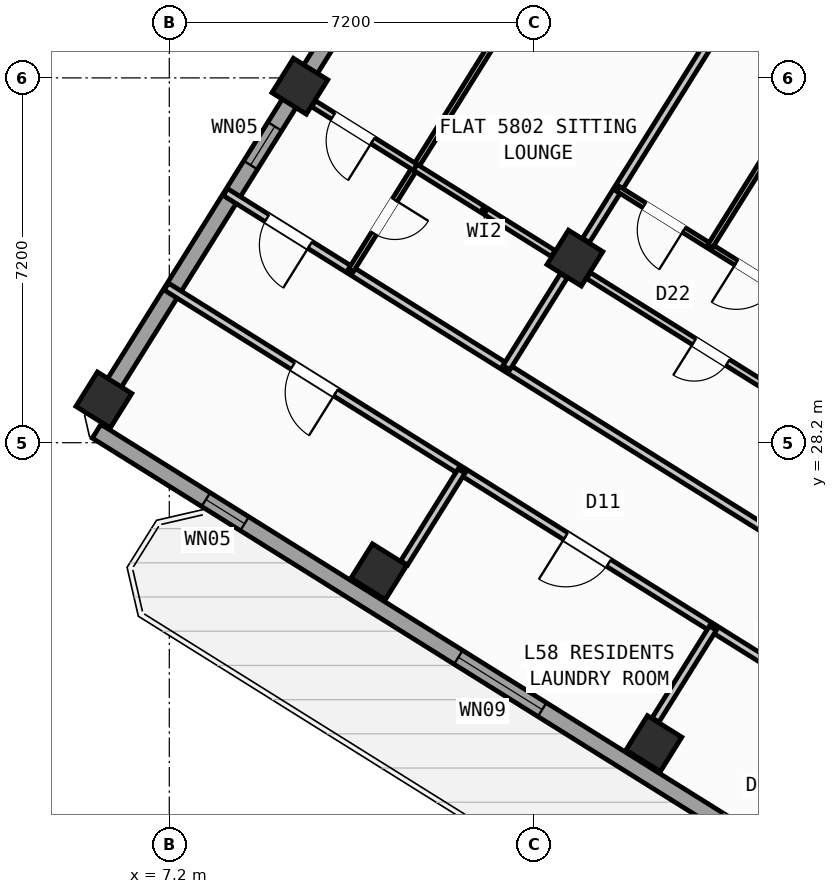
"""IFC4 building model, lengths in metres.
Left out: names, types, materials, properties, quantities, classifications, styles, units other than length and angle.
Written with IfcOpenShell. Run it as: python <this file> out.ifc"""

import sys

from ifc_helpers import new_model, si_unit, direction, frame, frame_2d, origin, origin_2d, place, context, subcontext, project, spatial, rectangle, hollow_rectangle, extrude, source, transform, mapped, element, fill, save


model = new_model("IFC4")
c1 = context("Model", 3, precision=1e-05, world=origin(), true_north=direction((0.0, 1.0)))
c2 = subcontext(c1, "Body", "Model", "MODEL_VIEW")
j1 = project(units=[si_unit("LENGTHUNIT", "METRE"), si_unit("PLANEANGLEUNIT", "RADIAN")], contexts=[c1])
p1 = place(None, origin())
s1 = spatial("IfcSite", under=j1, at=p1, CompositionType="ELEMENT")
p2 = place(p1, origin())
s2 = spatial("IfcBuilding", under=s1, at=p2, CompositionType="ELEMENT")
p3 = place(p2, frame((0.0, 0.0, 229.2)))
s3 = spatial("IfcBuildingStorey", under=s2, at=p3, CompositionType="ELEMENT", Elevation=229.2)
m1 = source(origin(), c2, "Body", "SweptSolid", [
    extrude(hollow_rectangle(XDim=0.8, YDim=0.8, WallThickness=0.032, at=origin_2d()), origin(), (0.0, 0.0, 1.0), 4.5),
])
for number, where, z_axis, x_axis in (
    (1, (16.764, 22.261, 0.0), (0.0, 0.0, 1.0), (-0.848, 0.53, 0.0)),
    (2, (15.205, 31.844, 0.0), (0.0, 0.0, 1.0), (-0.848, 0.53, 0.0)),
    (3, (11.336, 25.653, 0.0), (0.0, 0.0, 1.0), (-0.848, 0.53, 0.0)),
    (4, (9.777, 35.235, 0.0), (0.0, 0.0, 1.0), (-0.848, 0.53, 0.0)),
    (5, (5.909, 29.044, 0.0), (0.0, 0.0, 1.0), (-0.848, 0.53, 0.0)),
):
    element("IfcColumn", number, at=place(p3, frame(where, z_axis=z_axis, x_axis=x_axis)), inside=s3, PredefinedType="COLUMN", context=c2, shape_type="MappedRepresentation", body=[
        mapped(m1, transform((0.0, 0.0, 0.0), scale=1.0)),
    ])
p4 = place(p3, frame((31.76, 12.183, 0.0), z_axis=(0.0, 0.0, 1.0), x_axis=(-0.848047074256, 0.529920899612, 0.0)))
e6 = element("IfcWall", 6, at=p4, inside=s3, PredefinedType="STANDARD", context=c2, shape_type="SweptSolid", body=[
    extrude(rectangle(XDim=30.652, YDim=0.32, at=frame_2d((15.326, 0.0))), origin(), (0.0, 0.0, 1.0), 4.22),
])
p5 = place(p4, frame((14.966, 0.0, 0.0)))
e7 = element("IfcOpeningElement", 7, at=p5, cuts=e6, PredefinedType="OPENING", context=c2, shape_type="SweptSolid", body=[
    extrude(rectangle(XDim=1.2, YDim=2.15, at=frame_2d((0.6, 1.075))), frame((0.0, 0.17, 0.0), z_axis=(0.0, -1.0, 0.0), x_axis=(1.0, 0.0, 0.0)), (0.0, 0.0, 1.0), 0.34),
])
p6 = place(p4, frame((2.096, 0.0, 0.9)))
e8 = element("IfcOpeningElement", 8, at=p6, cuts=e6, PredefinedType="OPENING", context=c2, shape_type="SweptSolid", body=[
    extrude(rectangle(XDim=1.65, YDim=1.45, at=frame_2d((0.825, 0.725))), frame((0.0, 0.17, 0.0), z_axis=(0.0, -1.0, 0.0), x_axis=(1.0, 0.0, 0.0)), (0.0, 0.0, 1.0), 0.34),
])
p7 = place(p4, frame((6.771, 0.0, 0.9)))
e9 = element("IfcOpeningElement", 9, at=p7, cuts=e6, PredefinedType="OPENING", context=c2, shape_type="SweptSolid", body=[
    extrude(rectangle(XDim=1.65, YDim=1.45, at=frame_2d((0.825, 0.725))), frame((0.0, 0.17, 0.0), z_axis=(0.0, -1.0, 0.0), x_axis=(1.0, 0.0, 0.0)), (0.0, 0.0, 1.0), 0.34),
])
p8 = place(p4, frame((20.283, 0.0, 0.95)))
e10 = element("IfcOpeningElement", 10, at=p8, cuts=e6, PredefinedType="OPENING", context=c2, shape_type="SweptSolid", body=[
    extrude(rectangle(XDim=1.95, YDim=1.35, at=frame_2d((0.975, 0.675))), frame((0.0, 0.17, 0.0), z_axis=(0.0, -1.0, 0.0), x_axis=(1.0, 0.0, 0.0)), (0.0, 0.0, 1.0), 0.34),
])
p9 = place(p4, frame((27.208, 0.0, 1.0)))
e11 = element("IfcOpeningElement", 11, at=p9, cuts=e6, PredefinedType="OPENING", context=c2, shape_type="SweptSolid", body=[
    extrude(rectangle(XDim=0.9, YDim=1.25, at=frame_2d((0.45, 0.625))), frame((0.0, 0.17, 0.0), z_axis=(0.0, -1.0, 0.0), x_axis=(1.0, 0.0, 0.0)), (0.0, 0.0, 1.0), 0.34),
])
p10 = place(p3, frame((5.7, 28.71, 0.0), z_axis=(0.0, 0.0, 1.0), x_axis=(0.529923711467, 0.8480453172, 0.0)))
e12 = element("IfcWall", 12, at=p10, inside=s3, PredefinedType="STANDARD", context=c2, shape_type="SweptSolid", body=[
    extrude(rectangle(XDim=21.587, YDim=0.32, at=frame_2d((10.794, 0.0))), origin(), (0.0, 0.0, 1.0), 2.395),
])
p11 = place(p10, frame((5.859, 0.0, 1.0)))
e13 = element("IfcOpeningElement", 13, at=p11, cuts=e12, PredefinedType="OPENING", context=c2, shape_type="SweptSolid", body=[
    extrude(rectangle(XDim=0.9, YDim=1.25, at=frame_2d((0.45, 0.625))), frame((0.0, 0.17, 0.0), z_axis=(0.0, -1.0, 0.0), x_axis=(1.0, 0.0, 0.0)), (0.0, 0.0, 1.0), 0.34),
])
p12 = place(p10, frame((9.444, 0.0, 1.0)))
e14 = element("IfcOpeningElement", 14, at=p12, cuts=e12, PredefinedType="OPENING", context=c2, shape_type="SweptSolid", body=[
    extrude(rectangle(XDim=0.9, YDim=1.25, at=frame_2d((0.45, 0.625))), frame((0.0, 0.17, 0.0), z_axis=(0.0, -1.0, 0.0), x_axis=(1.0, 0.0, 0.0)), (0.0, 0.0, 1.0), 0.34),
])
p13 = place(p10, frame((12.344, 0.0, 1.0)))
e15 = element("IfcOpeningElement", 15, at=p13, cuts=e12, PredefinedType="OPENING", context=c2, shape_type="SweptSolid", body=[
    extrude(rectangle(XDim=0.9, YDim=1.25, at=frame_2d((0.45, 0.625))), frame((0.0, 0.17, 0.0), z_axis=(0.0, -1.0, 0.0), x_axis=(1.0, 0.0, 0.0)), (0.0, 0.0, 1.0), 0.34),
])
p14 = place(p10, frame((16.5, 0.0, 1.0)))
e16 = element("IfcOpeningElement", 16, at=p14, cuts=e12, PredefinedType="OPENING", context=c2, shape_type="SweptSolid", body=[
    extrude(rectangle(XDim=0.9, YDim=1.25, at=frame_2d((0.45, 0.625))), frame((0.0, 0.17, 0.0), z_axis=(0.0, -1.0, 0.0), x_axis=(1.0, 0.0, 0.0)), (0.0, 0.0, 1.0), 0.34),
])
p15 = place(p10, frame((18.913, 0.0, 1.0)))
e17 = element("IfcOpeningElement", 17, at=p15, cuts=e12, PredefinedType="OPENING", context=c2, shape_type="SweptSolid", body=[
    extrude(rectangle(XDim=0.9, YDim=1.25, at=frame_2d((0.45, 0.625))), frame((0.0, 0.17, 0.0), z_axis=(0.0, -1.0, 0.0), x_axis=(1.0, 0.0, 0.0)), (0.0, 0.0, 1.0), 0.34),
])
p16 = place(p3, frame((17.424, 47.083, 0.0), z_axis=(0.0, 0.0, 1.0), x_axis=(0.848049927979, -0.529916332693, 0.0)))
e18 = element("IfcWall", 18, at=p16, inside=s3, PredefinedType="STANDARD", context=c2, shape_type="SweptSolid", body=[
    extrude(rectangle(XDim=29.223, YDim=0.32, at=frame_2d((14.612, 0.0))), origin(), (0.0, 0.0, 1.0), 4.22),
])
p17 = place(p16, frame((3.709, 0.0, 0.0)))
e19 = element("IfcOpeningElement", 19, at=p17, cuts=e18, PredefinedType="OPENING", context=c2, shape_type="SweptSolid", body=[
    extrude(rectangle(XDim=1.05, YDim=2.15, at=frame_2d((0.525, 1.075))), frame((0.0, 0.17, 0.0), z_axis=(0.0, -1.0, 0.0), x_axis=(1.0, 0.0, 0.0)), (0.0, 0.0, 1.0), 0.34),
])
p18 = place(p16, frame((0.809, 0.0, 1.0)))
e20 = element("IfcOpeningElement", 20, at=p18, cuts=e18, PredefinedType="OPENING", context=c2, shape_type="SweptSolid", body=[
    extrude(rectangle(XDim=0.9, YDim=1.25, at=frame_2d((0.45, 0.625))), frame((0.0, 0.17, 0.0), z_axis=(0.0, -1.0, 0.0), x_axis=(1.0, 0.0, 0.0)), (0.0, 0.0, 1.0), 0.34),
])
p19 = place(p16, frame((13.811, 0.0, 0.9)))
e21 = element("IfcOpeningElement", 21, at=p19, cuts=e18, PredefinedType="OPENING", context=c2, shape_type="SweptSolid", body=[
    extrude(rectangle(XDim=1.35, YDim=1.45, at=frame_2d((0.675, 0.725))), frame((0.0, 0.17, 0.0), z_axis=(0.0, -1.0, 0.0), x_axis=(1.0, 0.0, 0.0)), (0.0, 0.0, 1.0), 0.34),
])
p20 = place(p16, frame((17.254, 0.0, 1.0)))
e22 = element("IfcOpeningElement", 22, at=p20, cuts=e18, PredefinedType="OPENING", context=c2, shape_type="SweptSolid", body=[
    extrude(rectangle(XDim=0.9, YDim=1.25, at=frame_2d((0.45, 0.625))), frame((0.0, 0.17, 0.0), z_axis=(0.0, -1.0, 0.0), x_axis=(1.0, 0.0, 0.0)), (0.0, 0.0, 1.0), 0.34),
])
p21 = place(p16, frame((21.364, 0.0, 1.0)))
e23 = element("IfcOpeningElement", 23, at=p21, cuts=e18, PredefinedType="OPENING", context=c2, shape_type="SweptSolid", body=[
    extrude(rectangle(XDim=0.9, YDim=1.25, at=frame_2d((0.45, 0.625))), frame((0.0, 0.17, 0.0), z_axis=(0.0, -1.0, 0.0), x_axis=(1.0, 0.0, 0.0)), (0.0, 0.0, 1.0), 0.34),
])
p22 = place(p16, frame((26.003, 0.0, 1.0)))
e24 = element("IfcOpeningElement", 24, at=p22, cuts=e18, PredefinedType="OPENING", context=c2, shape_type="SweptSolid", body=[
    extrude(rectangle(XDim=0.9, YDim=1.25, at=frame_2d((0.45, 0.625))), frame((0.0, 0.17, 0.0), z_axis=(0.0, -1.0, 0.0), x_axis=(1.0, 0.0, 0.0)), (0.0, 0.0, 1.0), 0.34),
])
p23 = place(p16, frame((11.211, 0.0, 1.0)))
e25 = element("IfcOpeningElement", 25, at=p23, cuts=e18, PredefinedType="OPENING", context=c2, shape_type="SweptSolid", body=[
    extrude(rectangle(XDim=0.65, YDim=1.15, at=frame_2d((0.325, 0.575))), frame((0.0, 0.17, 0.0), z_axis=(0.0, -1.0, 0.0), x_axis=(1.0, 0.0, 0.0)), (0.0, 0.0, 1.0), 0.34),
])
p24 = place(p16, frame((9.079, 0.0, 1.0)))
e26 = element("IfcOpeningElement", 26, at=p24, cuts=e18, PredefinedType="OPENING", context=c2, shape_type="SweptSolid", body=[
    extrude(rectangle(XDim=0.65, YDim=1.15, at=frame_2d((0.325, 0.575))), frame((0.0, 0.17, 0.0), z_axis=(0.0, -1.0, 0.0), x_axis=(1.0, 0.0, 0.0)), (0.0, 0.0, 1.0), 0.34),
])
p25 = place(p16, frame((6.951, 0.0, 1.0)))
e27 = element("IfcOpeningElement", 27, at=p25, cuts=e18, PredefinedType="OPENING", context=c2, shape_type="SweptSolid", body=[
    extrude(rectangle(XDim=0.65, YDim=1.15, at=frame_2d((0.325, 0.575))), frame((0.0, 0.17, 0.0), z_axis=(0.0, -1.0, 0.0), x_axis=(1.0, 0.0, 0.0)), (0.0, 0.0, 1.0), 0.34),
])
p26 = place(p3, frame((22.495, 24.281, 0.0), z_axis=(0.0, 0.0, 1.0), x_axis=(-0.848052408131, 0.529912363569, 0.0)))
e28 = element("IfcWall", 28, at=p26, inside=s3, PredefinedType="PARTITIONING", context=c2, shape_type="SweptSolid", body=[
    extrude(rectangle(XDim=16.73, YDim=0.16, at=frame_2d((8.365, 0.0))), origin(), (0.0, 0.0, 1.0), 4.21),
])
p27 = place(p26, frame((1.385, 0.0, 0.0)))
e29 = element("IfcOpeningElement", 29, at=p27, cuts=e28, PredefinedType="OPENING", context=c2, shape_type="SweptSolid", body=[
    extrude(rectangle(XDim=1.0, YDim=2.1, at=frame_2d((0.5, 1.05))), frame((0.0, 0.09, 0.0), z_axis=(0.0, -1.0, 0.0), x_axis=(1.0, 0.0, 0.0)), (0.0, 0.0, 1.0), 0.18),
])
p28 = place(p26, frame((14.76, 0.0, 0.0)))
e30 = element("IfcOpeningElement", 30, at=p28, cuts=e28, PredefinedType="OPENING", context=c2, shape_type="SweptSolid", body=[
    extrude(rectangle(XDim=1.0, YDim=2.1, at=frame_2d((0.5, 1.05))), frame((0.0, 0.09, 0.0), z_axis=(0.0, -1.0, 0.0), x_axis=(1.0, 0.0, 0.0)), (0.0, 0.0, 1.0), 0.18),
])
p29 = place(p3, frame((21.329, 22.416, 0.0), z_axis=(0.0, 0.0, 1.0), x_axis=(-0.848052408131, 0.529912363569, 0.0)))
e31 = element("IfcWall", 31, at=p29, inside=s3, PredefinedType="PARTITIONING", context=c2, shape_type="SweptSolid", body=[
    extrude(rectangle(XDim=16.73, YDim=0.16, at=frame_2d((8.365, 0.0))), origin(), (0.0, 0.0, 1.0), 4.21),
])
p30 = place(p29, frame((1.505, 0.0, 0.0)))
e32 = element("IfcOpeningElement", 32, at=p30, cuts=e31, PredefinedType="OPENING", context=c2, shape_type="SweptSolid", body=[
    extrude(rectangle(XDim=1.0, YDim=2.1, at=frame_2d((0.5, 1.05))), frame((0.0, 0.09, 0.0), z_axis=(0.0, -1.0, 0.0), x_axis=(1.0, 0.0, 0.0)), (0.0, 0.0, 1.0), 0.18),
])
p31 = place(p29, frame((6.435, 0.0, 0.0)))
e33 = element("IfcOpeningElement", 33, at=p31, cuts=e31, PredefinedType="OPENING", context=c2, shape_type="SweptSolid", body=[
    extrude(rectangle(XDim=1.0, YDim=2.1, at=frame_2d((0.5, 1.05))), frame((0.0, 0.09, 0.0), z_axis=(0.0, -1.0, 0.0), x_axis=(1.0, 0.0, 0.0)), (0.0, 0.0, 1.0), 0.18),
])
p32 = place(p29, frame((12.784, 0.0, 0.0)))
e34 = element("IfcOpeningElement", 34, at=p32, cuts=e31, PredefinedType="OPENING", context=c2, shape_type="SweptSolid", body=[
    extrude(rectangle(XDim=1.0, YDim=2.1, at=frame_2d((0.5, 1.05))), frame((0.0, 0.09, 0.0), z_axis=(0.0, -1.0, 0.0), x_axis=(1.0, 0.0, 0.0)), (0.0, 0.0, 1.0), 0.18),
])
p33 = place(p3, frame((17.928, 24.541, 0.0), z_axis=(0.0, 0.0, 1.0), x_axis=(-0.529844966244, -0.848094518167, 0.0)))
e35 = element("IfcWall", 35, at=p33, inside=s3, PredefinedType="PARTITIONING", context=c2, shape_type="SweptSolid", body=[
    extrude(rectangle(XDim=2.138, YDim=0.16, at=frame_2d((1.069, 0.0))), origin(), (0.0, 0.0, 1.0), 2.395),
])
p34 = place(p3, frame((12.968, 27.64, 0.0), z_axis=(0.0, 0.0, 1.0), x_axis=(-0.52989628283, -0.848062456098, 0.0)))
e36 = element("IfcWall", 36, at=p34, inside=s3, PredefinedType="PARTITIONING", context=c2, shape_type="SweptSolid", body=[
    extrude(rectangle(XDim=2.138, YDim=0.16, at=frame_2d((1.069, 0.0))), origin(), (0.0, 0.0, 1.0), 2.395),
])
p35 = place(p3, frame((18.854, 37.685, 0.0), z_axis=(0.0, 0.0, 1.0), x_axis=(-0.529907440938, -0.848055484057, 0.0)))
e37 = element("IfcWall", 37, at=p35, inside=s3, PredefinedType="PARTITIONING", context=c2, shape_type="SweptSolid", body=[
    extrude(rectangle(XDim=6.476, YDim=0.16, at=frame_2d((3.238, 0.0))), origin(), (0.0, 0.0, 1.0), 2.395),
])
p36 = place(p3, frame((14.986, 31.494, 0.0), z_axis=(0.0, 0.0, 1.0), x_axis=(-0.52989628283, -0.848062456098, 0.0)))
e38 = element("IfcWall", 38, at=p36, inside=s3, PredefinedType="PARTITIONING", context=c2, shape_type="SweptSolid", body=[
    extrude(rectangle(XDim=2.138, YDim=0.16, at=frame_2d((1.069, 0.0))), origin(), (0.0, 0.0, 1.0), 2.395),
])
p37 = place(p3, frame((20.203, 28.543, 0.0), z_axis=(0.0, 0.0, 1.0), x_axis=(-0.848049955116, 0.529916289265, 0.0)))
e39 = element("IfcWall", 39, at=p37, inside=s3, PredefinedType="PLUMBINGWALL", context=c2, shape_type="SweptSolid", body=[
    extrude(rectangle(XDim=5.576, YDim=0.14, at=frame_2d((2.788, 0.0))), origin(), (0.0, 0.0, 1.0), 3.745),
])
p38 = place(p37, frame((2.338, 0.0, 0.0)))
e40 = element("IfcOpeningElement", 40, at=p38, cuts=e39, PredefinedType="OPENING", context=c2, shape_type="SweptSolid", body=[
    extrude(rectangle(XDim=0.78, YDim=2.05, at=frame_2d((0.39, 1.025))), frame((0.0, 0.08, 0.0), z_axis=(0.0, -1.0, 0.0), x_axis=(1.0, 0.0, 0.0)), (0.0, 0.0, 1.0), 0.16),
])
p39 = place(p3, frame((21.502, 29.807, 0.0), z_axis=(0.0, 0.0, 1.0), x_axis=(-0.848051709137, 0.529913482212, 0.0)))
e41 = element("IfcWall", 41, at=p39, inside=s3, PredefinedType="PARTITIONING", context=c2, shape_type="SweptSolid", body=[
    extrude(rectangle(XDim=6.42, YDim=0.11, at=frame_2d((3.21, 0.0))), origin(), (0.0, 0.0, 1.0), 4.21),
])
p40 = place(p39, frame((0.61, 0.0, 0.0)))
e42 = element("IfcOpeningElement", 42, at=p40, cuts=e41, PredefinedType="OPENING", context=c2, shape_type="SweptSolid", body=[
    extrude(rectangle(XDim=0.92, YDim=2.08, at=frame_2d((0.46, 1.04))), frame((0.0, 0.065, 0.0), z_axis=(0.0, -1.0, 0.0), x_axis=(1.0, 0.0, 0.0)), (0.0, 0.0, 1.0), 0.13),
])
p41 = place(p39, frame((2.75, 0.0, 0.0)))
e43 = element("IfcOpeningElement", 43, at=p41, cuts=e41, PredefinedType="OPENING", context=c2, shape_type="SweptSolid", body=[
    extrude(rectangle(XDim=0.92, YDim=2.08, at=frame_2d((0.46, 1.04))), frame((0.0, 0.065, 0.0), z_axis=(0.0, -1.0, 0.0), x_axis=(1.0, 0.0, 0.0)), (0.0, 0.0, 1.0), 0.13),
])
p42 = place(p39, frame((4.89, 0.0, 0.0)))
e44 = element("IfcOpeningElement", 44, at=p42, cuts=e41, PredefinedType="OPENING", context=c2, shape_type="SweptSolid", body=[
    extrude(rectangle(XDim=0.92, YDim=2.08, at=frame_2d((0.46, 1.04))), frame((0.0, 0.065, 0.0), z_axis=(0.0, -1.0, 0.0), x_axis=(1.0, 0.0, 0.0)), (0.0, 0.0, 1.0), 0.13),
])
p43 = place(p3, frame((24.555, 42.769, 0.0), z_axis=(0.0, 0.0, 1.0), x_axis=(-0.529911921261, -0.848052684511, 0.0)))
e45 = element("IfcWall", 45, at=p43, inside=s3, PredefinedType="PARTITIONING", context=c2, shape_type="SweptSolid", body=[
    extrude(rectangle(XDim=12.61, YDim=0.11, at=frame_2d((6.305, 0.0))), origin(), (0.0, 0.0, 1.0), 3.895),
])
p44 = place(p3, frame((19.67, 45.821, 0.0), z_axis=(0.0, 0.0, 1.0), x_axis=(-0.529920421309, -0.848047373134, 0.0)))
e46 = element("IfcWall", 46, at=p44, inside=s3, PredefinedType="PARTITIONING", context=c2, shape_type="SweptSolid", body=[
    extrude(rectangle(XDim=16.77, YDim=0.11, at=frame_2d((8.385, 0.0))), origin(), (0.0, 0.0, 1.0), 4.21),
])
p45 = place(p44, frame((15.13, 0.0, 0.0)))
e47 = element("IfcOpeningElement", 47, at=p45, cuts=e46, PredefinedType="OPENING", context=c2, shape_type="SweptSolid", body=[
    extrude(rectangle(XDim=0.78, YDim=2.05, at=frame_2d((0.39, 1.025))), frame((0.0, 0.065, 0.0), z_axis=(0.0, -1.0, 0.0), x_axis=(1.0, 0.0, 0.0)), (0.0, 0.0, 1.0), 0.13),
])
p46 = place(p44, frame((9.884, 0.0, 0.0)))
e48 = element("IfcOpeningElement", 48, at=p46, cuts=e46, PredefinedType="OPENING", context=c2, shape_type="SweptSolid", body=[
    extrude(rectangle(XDim=0.92, YDim=2.08, at=frame_2d((0.46, 1.04))), frame((0.0, 0.065, 0.0), z_axis=(0.0, -1.0, 0.0), x_axis=(1.0, 0.0, 0.0)), (0.0, 0.0, 1.0), 0.13),
])
p47 = place(p3, frame((12.055, 33.635, 0.0), z_axis=(0.0, 0.0, 1.0), x_axis=(-0.848102546264, 0.529832115883, 0.0)))
e49 = element("IfcWall", 49, at=p47, inside=s3, PredefinedType="PLUMBINGWALL", context=c2, shape_type="SweptSolid", body=[
    extrude(rectangle(XDim=2.368, YDim=0.14, at=frame_2d((1.184, 0.0))), origin(), (0.0, 0.0, 1.0), 3.745),
])
p48 = place(p47, frame((0.99, 0.0, 0.0)))
e50 = element("IfcOpeningElement", 50, at=p48, cuts=e49, PredefinedType="OPENING", context=c2, shape_type="SweptSolid", body=[
    extrude(rectangle(XDim=0.92, YDim=2.08, at=frame_2d((0.46, 1.04))), frame((0.0, 0.08, 0.0), z_axis=(0.0, -1.0, 0.0), x_axis=(1.0, 0.0, 0.0)), (0.0, 0.0, 1.0), 0.16),
])
p49 = place(p3, frame((14.776, 31.935, 0.0), z_axis=(0.0, 0.0, 1.0), x_axis=(-0.848011130036, 0.529978417802, 0.0)))
e51 = element("IfcWall", 51, at=p49, inside=s3, PredefinedType="PLUMBINGWALL", context=c2, shape_type="SweptSolid", body=[
    extrude(rectangle(XDim=3.208, YDim=0.14, at=frame_2d((1.604, 0.0))), origin(), (0.0, 0.0, 1.0), 3.745),
])
m2 = source(origin(), c2, "Body", "SweptSolid", [
    extrude(rectangle(XDim=1.95, YDim=1.35, at=frame_2d((0.975, 0.675))), frame((0.0, 0.03, 0.0), z_axis=(0.0, -1.0, 0.0), x_axis=(1.0, 0.0, 0.0)), (0.0, 0.0, 1.0), 0.06),
])
p50 = place(p8, origin())
e52 = element("IfcWindow", 52, at=p50, inside=s3, PartitioningType="SINGLE_PANEL", PredefinedType="WINDOW", context=c2, shape_type="MappedRepresentation", body=[
    mapped(m2, transform((0.0, 0.0, 0.0), scale=1.0)),
])
fill(e10, e52)
m3 = source(origin(), c2, "Body", "SweptSolid", [
    extrude(rectangle(XDim=0.9, YDim=1.25, at=frame_2d((0.45, 0.625))), frame((0.0, 0.03, 0.0), z_axis=(0.0, -1.0, 0.0), x_axis=(1.0, 0.0, 0.0)), (0.0, 0.0, 1.0), 0.06),
])
p51 = place(p9, origin())
e53 = element("IfcWindow", 53, at=p51, inside=s3, PartitioningType="SINGLE_PANEL", PredefinedType="WINDOW", context=c2, shape_type="MappedRepresentation", body=[
    mapped(m3, transform((0.0, 0.0, 0.0), scale=1.0)),
])
fill(e11, e53)
p52 = place(p11, origin())
e54 = element("IfcWindow", 54, at=p52, inside=s3, PartitioningType="SINGLE_PANEL", PredefinedType="WINDOW", context=c2, shape_type="MappedRepresentation", body=[
    mapped(m3, transform((0.0, 0.0, 0.0), scale=1.0)),
])
fill(e13, e54)
m4 = source(origin(), c2, "Body", "SweptSolid", [
    extrude(rectangle(XDim=1.0, YDim=2.1, at=frame_2d((0.5, 1.05))), frame((0.0, 0.025, 0.0), z_axis=(0.0, -1.0, 0.0), x_axis=(1.0, 0.0, 0.0)), (0.0, 0.0, 1.0), 0.05),
])
p53 = place(p31, origin())
e55 = element("IfcDoor", 55, at=p53, inside=s3, OperationType="SINGLE_SWING_RIGHT", PredefinedType="DOOR", context=c2, shape_type="MappedRepresentation", body=[
    mapped(m4, transform((0.0, 0.0, 0.0), scale=1.0)),
])
fill(e33, e55)
p54 = place(p32, origin())
e56 = element("IfcDoor", 56, at=p54, inside=s3, OperationType="SINGLE_SWING_LEFT", PredefinedType="DOOR", context=c2, shape_type="MappedRepresentation", body=[
    mapped(m4, transform((0.0, 0.0, 0.0), scale=1.0)),
])
fill(e34, e56)
m5 = source(origin(), c2, "Body", "SweptSolid", [
    extrude(rectangle(XDim=0.78, YDim=2.05, at=frame_2d((0.39, 1.025))), frame((0.0, 0.025, 0.0), z_axis=(0.0, -1.0, 0.0), x_axis=(1.0, 0.0, 0.0)), (0.0, 0.0, 1.0), 0.05),
])
p55 = place(p38, origin())
e57 = element("IfcDoor", 57, at=p55, inside=s3, OperationType="SINGLE_SWING_RIGHT", PredefinedType="DOOR", context=c2, shape_type="MappedRepresentation", body=[
    mapped(m5, transform((0.0, 0.0, 0.0), scale=1.0)),
])
fill(e40, e57)
m6 = source(origin(), c2, "Body", "SweptSolid", [
    extrude(rectangle(XDim=0.92, YDim=2.08, at=frame_2d((0.46, 1.04))), frame((0.0, 0.025, 0.0), z_axis=(0.0, -1.0, 0.0), x_axis=(1.0, 0.0, 0.0)), (0.0, 0.0, 1.0), 0.05),
])
p56 = place(p41, origin())
e58 = element("IfcDoor", 58, at=p56, inside=s3, OperationType="SINGLE_SWING_RIGHT", PredefinedType="DOOR", context=c2, shape_type="MappedRepresentation", body=[
    mapped(m6, transform((0.0, 0.0, 0.0), scale=1.0)),
])
fill(e43, e58)
p57 = place(p42, origin())
e59 = element("IfcDoor", 59, at=p57, inside=s3, OperationType="SINGLE_SWING_LEFT", PredefinedType="DOOR", context=c2, shape_type="MappedRepresentation", body=[
    mapped(m6, transform((0.0, 0.0, 0.0), scale=1.0)),
])
fill(e44, e59)
p58 = place(p28, origin())
e60 = element("IfcDoor", 60, at=p58, inside=s3, OperationType="SINGLE_SWING_LEFT", PredefinedType="DOOR", context=c2, shape_type="MappedRepresentation", body=[
    mapped(m4, transform((0.0, 0.0, 0.0), scale=1.0)),
])
fill(e30, e60)
p59 = place(p48, origin())
e61 = element("IfcDoor", 61, at=p59, inside=s3, OperationType="SINGLE_SWING_LEFT", PredefinedType="DOOR", context=c2, shape_type="MappedRepresentation", body=[
    mapped(m6, transform((0.0, 0.0, 0.0), scale=1.0)),
])
fill(e50, e61)
p60 = place(p45, origin())
e62 = element("IfcDoor", 62, at=p60, inside=s3, OperationType="SINGLE_SWING_LEFT", PredefinedType="DOOR", context=c2, shape_type="MappedRepresentation", body=[
    mapped(m5, transform((0.0, 0.0, 0.0), scale=1.0)),
])
fill(e47, e62)
save(model, sys.argv[1])
